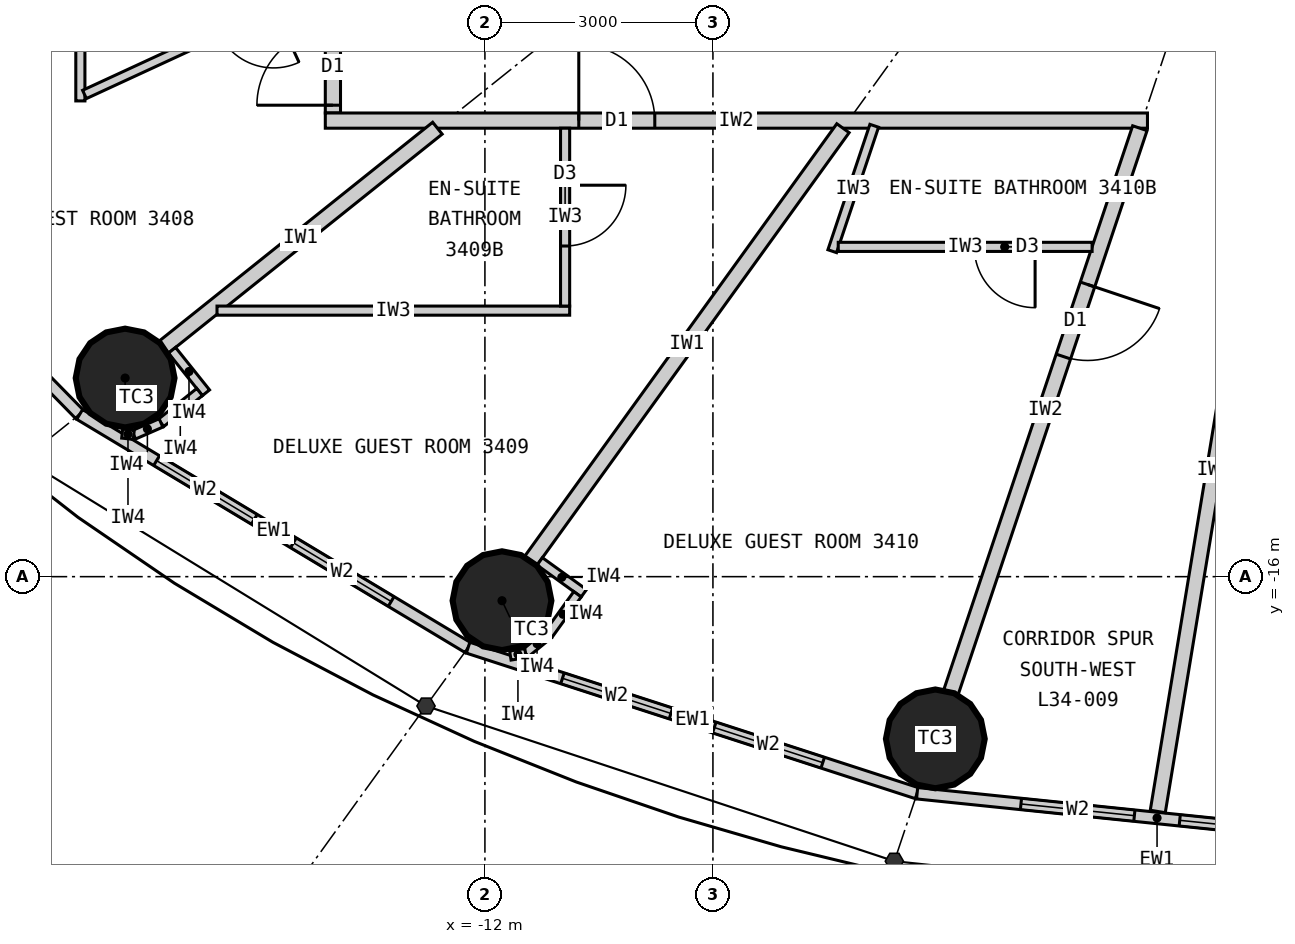
"""IFC4 building model, lengths in metres.
Left out: names, types, materials, properties, quantities, classifications, styles, units other than length and angle.
Written with IfcOpenShell. Run it as: python <this file> out.ifc"""

import sys

from ifc_helpers import new_model, si_unit, direction, frame, frame_2d, origin, origin_2d, place, context, subcontext, project, spatial, rectangle, circle, extrude, element, fill, save


model = new_model("IFC4")
c1 = context("Model", 3, precision=1e-05, world=origin(), true_north=direction((0.0, 1.0)))
c2 = subcontext(c1, "Body", "Model", "MODEL_VIEW")
j1 = project(units=[si_unit("LENGTHUNIT", "METRE"), si_unit("PLANEANGLEUNIT", "RADIAN")], contexts=[c1])
p1 = place(None, origin())
s1 = spatial("IfcSite", under=j1, at=p1, CompositionType="ELEMENT")
p2 = place(p1, origin())
s2 = spatial("IfcBuilding", under=s1, at=p2, CompositionType="ELEMENT")
p3 = place(p2, frame((0.0, 0.0, 132.0)))
s3 = spatial("IfcBuildingStorey", under=s2, at=p3, CompositionType="ELEMENT", Elevation=132.0)
for number, where, z_axis, x_axis in (
    (1, (-16.734, -13.387, 0.0), (0.0, 0.0, 1.0), (1.0, 0.0, 0.0)),
    (2, (-11.775, -16.316, 0.0), (0.0, 0.0, 1.0), (1.0, 0.0, 0.0)),
    (3, (-6.074, -18.135, 0.0), (0.0, 0.0, 1.0), (1.0, 0.0, 0.0)),
):
    element("IfcColumn", number, at=place(p3, frame(where, z_axis=z_axis, x_axis=x_axis)), inside=s3, PredefinedType="COLUMN", context=c2, shape_type="SweptSolid", body=[
        extrude(circle(Radius=0.65, at=origin_2d()), origin(), (0.0, 0.0, 1.0), 3.3),
    ])
p4 = place(p3, frame((-21.287, -9.832, 0.0), z_axis=(0.0, 0.0, 1.0), x_axis=(0.700136650834, -0.714008872605, 0.0)))
e4 = element("IfcWall", 4, at=p4, inside=s3, PredefinedType="ELEMENTEDWALL", context=c2, shape_type="SweptSolid", body=[
    extrude(rectangle(XDim=5.649, YDim=0.15, at=frame_2d((2.825, 0.0))), origin(), (0.0, 0.0, 1.0), 3.12),
])
p5 = place(p4, frame((1.025, 0.0, 0.9)))
e5 = element("IfcOpeningElement", 5, at=p5, cuts=e4, PredefinedType="OPENING", context=c2, shape_type="SweptSolid", body=[
    extrude(rectangle(XDim=1.5, YDim=1.9, at=frame_2d((0.75, 0.95))), frame((0.0, 0.085, 0.0), z_axis=(0.0, -1.0, 0.0), x_axis=(1.0, 0.0, 0.0)), (0.0, 0.0, 1.0), 0.17),
])
p6 = place(p4, frame((3.125, 0.0, 0.9)))
e6 = element("IfcOpeningElement", 6, at=p6, cuts=e4, PredefinedType="OPENING", context=c2, shape_type="SweptSolid", body=[
    extrude(rectangle(XDim=1.5, YDim=1.9, at=frame_2d((0.75, 0.95))), frame((0.0, 0.085, 0.0), z_axis=(0.0, -1.0, 0.0), x_axis=(1.0, 0.0, 0.0)), (0.0, 0.0, 1.0), 0.17),
])
p7 = place(p3, frame((-17.332, -13.866, 0.0), z_axis=(0.0, 0.0, 1.0), x_axis=(0.857308573723, -0.514802884044, 0.0)))
e7 = element("IfcWall", 7, at=p7, inside=s3, PredefinedType="ELEMENTEDWALL", context=c2, shape_type="SweptSolid", body=[
    extrude(rectangle(XDim=5.961, YDim=0.15, at=frame_2d((2.98, 0.0))), origin(), (0.0, 0.0, 1.0), 3.12),
])
p8 = place(p7, frame((1.181, 0.0, 0.9)))
e8 = element("IfcOpeningElement", 8, at=p8, cuts=e7, PredefinedType="OPENING", context=c2, shape_type="SweptSolid", body=[
    extrude(rectangle(XDim=1.5, YDim=1.9, at=frame_2d((0.75, 0.95))), frame((0.0, 0.085, 0.0), z_axis=(0.0, -1.0, 0.0), x_axis=(1.0, 0.0, 0.0)), (0.0, 0.0, 1.0), 0.17),
])
p9 = place(p7, frame((3.281, 0.0, 0.9)))
e9 = element("IfcOpeningElement", 9, at=p9, cuts=e7, PredefinedType="OPENING", context=c2, shape_type="SweptSolid", body=[
    extrude(rectangle(XDim=1.5, YDim=1.9, at=frame_2d((0.75, 0.95))), frame((0.0, 0.085, 0.0), z_axis=(0.0, -1.0, 0.0), x_axis=(1.0, 0.0, 0.0)), (0.0, 0.0, 1.0), 0.17),
])
p10 = place(p3, frame((-12.221, -16.935, 0.0), z_axis=(0.0, 0.0, 1.0), x_axis=(0.951272691506, -0.308350881944, 0.0)))
e10 = element("IfcWall", 10, at=p10, inside=s3, PredefinedType="ELEMENTEDWALL", context=c2, shape_type="SweptSolid", body=[
    extrude(rectangle(XDim=6.211, YDim=0.15, at=frame_2d((3.105, 0.0))), origin(), (0.0, 0.0, 1.0), 3.12),
])
p11 = place(p10, frame((1.305, 0.0, 0.9)))
e11 = element("IfcOpeningElement", 11, at=p11, cuts=e10, PredefinedType="OPENING", context=c2, shape_type="SweptSolid", body=[
    extrude(rectangle(XDim=1.5, YDim=1.9, at=frame_2d((0.75, 0.95))), frame((0.0, 0.085, 0.0), z_axis=(0.0, -1.0, 0.0), x_axis=(1.0, 0.0, 0.0)), (0.0, 0.0, 1.0), 0.17),
])
p12 = place(p10, frame((3.405, 0.0, 0.9)))
e12 = element("IfcOpeningElement", 12, at=p12, cuts=e10, PredefinedType="OPENING", context=c2, shape_type="SweptSolid", body=[
    extrude(rectangle(XDim=1.5, YDim=1.9, at=frame_2d((0.75, 0.95))), frame((0.0, 0.085, 0.0), z_axis=(0.0, -1.0, 0.0), x_axis=(1.0, 0.0, 0.0)), (0.0, 0.0, 1.0), 0.17),
])
p13 = place(p3, frame((-6.313, -18.85, 0.0), z_axis=(0.0, 0.0, 1.0), x_axis=(0.994735690163, -0.102473931887, 0.0)))
e13 = element("IfcWall", 13, at=p13, inside=s3, PredefinedType="ELEMENTEDWALL", context=c2, shape_type="SweptSolid", body=[
    extrude(rectangle(XDim=6.347, YDim=0.15, at=frame_2d((3.173, 0.0))), origin(), (0.0, 0.0, 1.0), 3.12),
])
p14 = place(p13, frame((1.373, 0.0, 0.9)))
e14 = element("IfcOpeningElement", 14, at=p14, cuts=e13, PredefinedType="OPENING", context=c2, shape_type="SweptSolid", body=[
    extrude(rectangle(XDim=1.5, YDim=1.9, at=frame_2d((0.75, 0.95))), frame((0.0, 0.085, 0.0), z_axis=(0.0, -1.0, 0.0), x_axis=(1.0, 0.0, 0.0)), (0.0, 0.0, 1.0), 0.17),
])
p15 = place(p13, frame((3.473, 0.0, 0.9)))
e15 = element("IfcOpeningElement", 15, at=p15, cuts=e13, PredefinedType="OPENING", context=c2, shape_type="SweptSolid", body=[
    extrude(rectangle(XDim=1.5, YDim=1.9, at=frame_2d((0.75, 0.95))), frame((0.0, 0.085, 0.0), z_axis=(0.0, -1.0, 0.0), x_axis=(1.0, 0.0, 0.0)), (0.0, 0.0, 1.0), 0.17),
])
p16 = place(p3, frame((-14.0, 9.9, 0.0), z_axis=(0.0, 0.0, 1.0), x_axis=(0.0, -1.0, 0.0)))
e16 = element("IfcWall", 16, at=p16, inside=s3, PredefinedType="PARTITIONING", context=c2, shape_type="SweptSolid", body=[
    extrude(rectangle(XDim=19.8, YDim=0.2, at=frame_2d((9.9, 0.0))), origin(), (0.0, 0.0, 1.0), 3.12),
])
p17 = place(p16, frame((2.822, 0.0, 0.0)))
e17 = element("IfcOpeningElement", 17, at=p17, cuts=e16, PredefinedType="OPENING", context=c2, shape_type="SweptSolid", body=[
    extrude(rectangle(XDim=1.0, YDim=2.2, at=frame_2d((0.5, 1.1))), frame((0.0, 0.11, 0.0), z_axis=(0.0, -1.0, 0.0), x_axis=(1.0, 0.0, 0.0)), (0.0, 0.0, 1.0), 0.22),
])
p18 = place(p16, frame((13.742, 0.0, 0.0)))
e18 = element("IfcOpeningElement", 18, at=p18, cuts=e16, PredefinedType="OPENING", context=c2, shape_type="SweptSolid", body=[
    extrude(rectangle(XDim=1.0, YDim=2.2, at=frame_2d((0.5, 1.1))), frame((0.0, 0.11, 0.0), z_axis=(0.0, -1.0, 0.0), x_axis=(1.0, 0.0, 0.0)), (0.0, 0.0, 1.0), 0.22),
])
p19 = place(p16, frame((18.698, 0.0, 0.0)))
e19 = element("IfcOpeningElement", 19, at=p19, cuts=e16, PredefinedType="OPENING", context=c2, shape_type="SweptSolid", body=[
    extrude(rectangle(XDim=1.0, YDim=2.2, at=frame_2d((0.5, 1.1))), frame((0.0, 0.11, 0.0), z_axis=(0.0, -1.0, 0.0), x_axis=(1.0, 0.0, 0.0)), (0.0, 0.0, 1.0), 0.22),
])
p20 = place(p3, frame((-3.283, -10.0, 0.0), z_axis=(0.0, 0.0, 1.0), x_axis=(-1.0, 0.0, 0.0)))
e20 = element("IfcWall", 20, at=p20, inside=s3, PredefinedType="PARTITIONING", context=c2, shape_type="SweptSolid", body=[
    extrude(rectangle(XDim=10.817, YDim=0.2, at=frame_2d((5.409, 0.0))), origin(), (0.0, 0.0, 1.0), 3.12),
])
p21 = place(p20, frame((6.482, 0.0, 0.0)))
e21 = element("IfcOpeningElement", 21, at=p21, cuts=e20, PredefinedType="OPENING", context=c2, shape_type="SweptSolid", body=[
    extrude(rectangle(XDim=1.0, YDim=2.2, at=frame_2d((0.5, 1.1))), frame((0.0, 0.11, 0.0), z_axis=(0.0, -1.0, 0.0), x_axis=(1.0, 0.0, 0.0)), (0.0, 0.0, 1.0), 0.22),
])
p22 = place(p3, frame((-14.1, -6.512, 0.0), z_axis=(0.0, 0.0, 1.0), x_axis=(-0.907833019998, -0.419331858797, 0.0)))
e22 = element("IfcWall", 22, at=p22, inside=s3, PredefinedType="PARTITIONING", context=c2, shape_type="SweptSolid", body=[
    extrude(rectangle(XDim=6.505, YDim=0.2, at=frame_2d((3.252, 0.0))), origin(), (0.0, 0.0, 1.0), 2.22),
])
p23 = place(p3, frame((-12.625, -10.1, 0.0), z_axis=(0.0, 0.0, 1.0), x_axis=(-0.780863644897, -0.624701503182, 0.0)))
e23 = element("IfcWall", 23, at=p23, inside=s3, PredefinedType="PARTITIONING", context=c2, shape_type="SweptSolid", body=[
    extrude(rectangle(XDim=4.612, YDim=0.2, at=frame_2d((2.306, 0.0))), origin(), (0.0, 0.0, 1.0), 2.27),
])
p24 = place(p3, frame((-7.289, -10.1, 0.0), z_axis=(0.0, 0.0, 1.0), x_axis=(-0.585217367024, -0.81087645997, 0.0)))
e24 = element("IfcWall", 24, at=p24, inside=s3, PredefinedType="PARTITIONING", context=c2, shape_type="SweptSolid", body=[
    extrude(rectangle(XDim=7.016, YDim=0.2, at=frame_2d((3.508, 0.0))), origin(), (0.0, 0.0, 1.0), 2.27),
])
p25 = place(p3, frame((-3.383, -10.1, 0.0), z_axis=(0.0, 0.0, 1.0), x_axis=(-0.317603705574, -0.948223542318, 0.0)))
e25 = element("IfcWall", 25, at=p25, inside=s3, PredefinedType="PARTITIONING", context=c2, shape_type="SweptSolid", body=[
    extrude(rectangle(XDim=7.823, YDim=0.2, at=frame_2d((3.912, 0.0))), origin(), (0.0, 0.0, 1.0), 2.27),
])
p26 = place(p25, frame((2.168, 0.0, 0.0)))
e26 = element("IfcOpeningElement", 26, at=p26, cuts=e25, PredefinedType="OPENING", context=c2, shape_type="SweptSolid", body=[
    extrude(rectangle(XDim=1.0, YDim=2.2, at=frame_2d((0.5, 1.1))), frame((0.0, 0.11, 0.0), z_axis=(0.0, -1.0, 0.0), x_axis=(1.0, 0.0, 0.0)), (0.0, 0.0, 1.0), 0.22),
])
p27 = place(p3, frame((-1.665, -10.1, 0.0), z_axis=(0.0, 0.0, 1.0), x_axis=(-0.162660519103, -0.986682094459, 0.0)))
e27 = element("IfcWall", 27, at=p27, inside=s3, PredefinedType="PARTITIONING", context=c2, shape_type="SweptSolid", body=[
    extrude(rectangle(XDim=9.111, YDim=0.2, at=frame_2d((4.555, 0.0))), origin(), (0.0, 0.0, 1.0), 3.12),
])
p28 = place(p27, frame((1.86, 0.0, 0.0)))
e28 = element("IfcOpeningElement", 28, at=p28, cuts=e27, PredefinedType="OPENING", context=c2, shape_type="SweptSolid", body=[
    extrude(rectangle(XDim=1.0, YDim=2.2, at=frame_2d((0.5, 1.1))), frame((0.0, 0.11, 0.0), z_axis=(0.0, -1.0, 0.0), x_axis=(1.0, 0.0, 0.0)), (0.0, 0.0, 1.0), 0.22),
])
p29 = place(p3, frame((-17.323, -8.101, 0.0), z_axis=(0.0, 0.0, 1.0), x_axis=(0.0, -1.0, 0.0)))
e29 = element("IfcWall", 29, at=p29, inside=s3, PredefinedType="PARTITIONING", context=c2, shape_type="SweptSolid", body=[
    extrude(rectangle(XDim=1.64, YDim=0.12, at=frame_2d((0.82, 0.0))), origin(), (0.0, 0.0, 1.0), 3.12),
])
p30 = place(p3, frame((-14.1, -8.193, 0.0), z_axis=(0.0, 0.0, 1.0), x_axis=(-0.907836493557, -0.419324338628, 0.0)))
e30 = element("IfcWall", 30, at=p30, inside=s3, PredefinedType="PARTITIONING", context=c2, shape_type="SweptSolid", body=[
    extrude(rectangle(XDim=3.49, YDim=0.12, at=frame_2d((1.745, 0.0))), origin(), (0.0, 0.0, 1.0), 3.12),
])
p31 = place(p30, frame((0.75, 0.0, 0.0)))
e31 = element("IfcOpeningElement", 31, at=p31, cuts=e30, PredefinedType="OPENING", context=c2, shape_type="SweptSolid", body=[
    extrude(rectangle(XDim=0.8, YDim=2.1, at=frame_2d((0.4, 1.05))), frame((0.0, 0.07, 0.0), z_axis=(0.0, -1.0, 0.0), x_axis=(1.0, 0.0, 0.0)), (0.0, 0.0, 1.0), 0.14),
])
p32 = place(p3, frame((-15.525, -12.5, 0.0), z_axis=(0.0, 0.0, 1.0), x_axis=(1.0, 0.0, 0.0)))
e32 = element("IfcWall", 32, at=p32, inside=s3, PredefinedType="PARTITIONING", context=c2, shape_type="SweptSolid", body=[
    extrude(rectangle(XDim=4.64, YDim=0.12, at=frame_2d((2.32, 0.0))), origin(), (0.0, 0.0, 1.0), 3.12),
])
p33 = place(p3, frame((-10.945, -10.1, 0.0), z_axis=(0.0, 0.0, 1.0), x_axis=(0.0, -1.0, 0.0)))
e33 = element("IfcWall", 33, at=p33, inside=s3, PredefinedType="PARTITIONING", context=c2, shape_type="SweptSolid", body=[
    extrude(rectangle(XDim=2.34, YDim=0.12, at=frame_2d((1.17, 0.0))), origin(), (0.0, 0.0, 1.0), 3.12),
])
p34 = place(p33, frame((0.75, 0.0, 0.0)))
e34 = element("IfcOpeningElement", 34, at=p34, cuts=e33, PredefinedType="OPENING", context=c2, shape_type="SweptSolid", body=[
    extrude(rectangle(XDim=0.8, YDim=2.1, at=frame_2d((0.4, 1.05))), frame((0.0, 0.07, 0.0), z_axis=(0.0, -1.0, 0.0), x_axis=(1.0, 0.0, 0.0)), (0.0, 0.0, 1.0), 0.14),
])
p35 = place(p3, frame((-6.878, -10.068, 0.0), z_axis=(0.0, 0.0, 1.0), x_axis=(-0.317532394508, -0.948247424694, 0.0)))
e35 = element("IfcWall", 35, at=p35, inside=s3, PredefinedType="PARTITIONING", context=c2, shape_type="SweptSolid", body=[
    extrude(rectangle(XDim=1.74, YDim=0.12, at=frame_2d((0.87, 0.0))), origin(), (0.0, 0.0, 1.0), 3.12),
])
p36 = place(p3, frame((-4.011, -11.661, 0.0), z_axis=(0.0, 0.0, 1.0), x_axis=(-1.0, 0.0, 0.0)))
e36 = element("IfcWall", 36, at=p36, inside=s3, PredefinedType="PARTITIONING", context=c2, shape_type="SweptSolid", body=[
    extrude(rectangle(XDim=3.34, YDim=0.12, at=frame_2d((1.67, 0.0))), origin(), (0.0, 0.0, 1.0), 3.12),
])
p37 = place(p36, frame((0.75, 0.0, 0.0)))
e37 = element("IfcOpeningElement", 37, at=p37, cuts=e36, PredefinedType="OPENING", context=c2, shape_type="SweptSolid", body=[
    extrude(rectangle(XDim=0.8, YDim=2.1, at=frame_2d((0.4, 1.05))), frame((0.0, 0.07, 0.0), z_axis=(0.0, -1.0, 0.0), x_axis=(1.0, 0.0, 0.0)), (0.0, 0.0, 1.0), 0.14),
])
p38 = place(p3, frame((-16.117, -13.022, 0.0), z_axis=(0.0, 0.0, 1.0), x_axis=(0.62465344249, -0.780902091677, 0.0)))
e38 = element("IfcWall", 38, at=p38, inside=s3, PredefinedType="PARTITIONING", context=c2, shape_type="SweptSolid", body=[
    extrude(rectangle(XDim=0.716, YDim=0.12, at=frame_2d((0.358, 0.0))), origin(), (0.0, 0.0, 1.0), 3.12),
])
p39 = place(p3, frame((-15.754, -13.571, 0.0), z_axis=(0.0, 0.0, 1.0), x_axis=(-0.780905453553, -0.624649239663, 0.0)))
e39 = element("IfcWall", 39, at=p39, inside=s3, PredefinedType="PARTITIONING", context=c2, shape_type="SweptSolid", body=[
    extrude(rectangle(XDim=0.65, YDim=0.12, at=frame_2d((0.325, 0.0))), origin(), (0.0, 0.0, 1.0), 3.12),
])
p40 = place(p3, frame((-16.262, -13.977, 0.0), z_axis=(0.0, 0.0, 1.0), x_axis=(-0.915985403703, -0.401211590314, 0.0)))
e40 = element("IfcWall", 40, at=p40, inside=s3, PredefinedType="PARTITIONING", context=c2, shape_type="SweptSolid", body=[
    extrude(rectangle(XDim=0.391, YDim=0.12, at=frame_2d((0.196, 0.0))), origin(), (0.0, 0.0, 1.0), 3.12),
])
p41 = place(p3, frame((-16.62, -14.134, 0.0), z_axis=(0.0, 0.0, 1.0), x_axis=(-0.993941871493, 0.109907033867, 0.0)))
e41 = element("IfcWall", 41, at=p41, inside=s3, PredefinedType="PARTITIONING", context=c2, shape_type="SweptSolid", body=[
    extrude(rectangle(XDim=0.153, YDim=0.12, at=frame_2d((0.077, 0.0))), origin(), (0.0, 0.0, 1.0), 3.12),
])
p42 = place(p3, frame((-11.279, -15.799, 0.0), z_axis=(0.0, 0.0, 1.0), x_axis=(0.810912957127, -0.585166793285, 0.0)))
e42 = element("IfcWall", 42, at=p42, inside=s3, PredefinedType="PARTITIONING", context=c2, shape_type="SweptSolid", body=[
    extrude(rectangle(XDim=0.716, YDim=0.12, at=frame_2d((0.358, 0.0))), origin(), (0.0, 0.0, 1.0), 3.12),
])
p43 = place(p3, frame((-10.782, -16.231, 0.0), z_axis=(0.0, 0.0, 1.0), x_axis=(-0.585175102182, -0.810906961239, 0.0)))
e43 = element("IfcWall", 43, at=p43, inside=s3, PredefinedType="PARTITIONING", context=c2, shape_type="SweptSolid", body=[
    extrude(rectangle(XDim=0.65, YDim=0.12, at=frame_2d((0.325, 0.0))), origin(), (0.0, 0.0, 1.0), 3.12),
])
p44 = place(p3, frame((-11.162, -16.759, 0.0), z_axis=(0.0, 0.0, 1.0), x_axis=(-0.775178428527, -0.63174235567, 0.0)))
e44 = element("IfcWall", 44, at=p44, inside=s3, PredefinedType="PARTITIONING", context=c2, shape_type="SweptSolid", body=[
    extrude(rectangle(XDim=0.392, YDim=0.12, at=frame_2d((0.196, 0.0))), origin(), (0.0, 0.0, 1.0), 3.12),
])
p45 = place(p3, frame((-11.466, -17.006, 0.0), z_axis=(0.0, 0.0, 1.0), x_axis=(-0.987228877621, -0.15930832744, 0.0)))
e45 = element("IfcWall", 45, at=p45, inside=s3, PredefinedType="PARTITIONING", context=c2, shape_type="SweptSolid", body=[
    extrude(rectangle(XDim=0.202, YDim=0.12, at=frame_2d((0.101, 0.0))), origin(), (0.0, 0.0, 1.0), 3.12),
])
p46 = place(p8, origin())
e46 = element("IfcWindow", 46, at=p46, inside=s3, PartitioningType="SINGLE_PANEL", PredefinedType="WINDOW", context=c2, shape_type="SweptSolid", body=[
    extrude(rectangle(XDim=1.5, YDim=1.9, at=frame_2d((0.75, 0.95))), frame((0.0, 0.03, 0.0), z_axis=(0.0, -1.0, 0.0), x_axis=(1.0, 0.0, 0.0)), (0.0, 0.0, 1.0), 0.06),
])
fill(e8, e46)
p47 = place(p9, origin())
e47 = element("IfcWindow", 47, at=p47, inside=s3, PartitioningType="SINGLE_PANEL", PredefinedType="WINDOW", context=c2, shape_type="SweptSolid", body=[
    extrude(rectangle(XDim=1.5, YDim=1.9, at=frame_2d((0.75, 0.95))), frame((0.0, 0.03, 0.0), z_axis=(0.0, -1.0, 0.0), x_axis=(1.0, 0.0, 0.0)), (0.0, 0.0, 1.0), 0.06),
])
fill(e9, e47)
p48 = place(p11, origin())
e48 = element("IfcWindow", 48, at=p48, inside=s3, PartitioningType="SINGLE_PANEL", PredefinedType="WINDOW", context=c2, shape_type="SweptSolid", body=[
    extrude(rectangle(XDim=1.5, YDim=1.9, at=frame_2d((0.75, 0.95))), frame((0.0, 0.03, 0.0), z_axis=(0.0, -1.0, 0.0), x_axis=(1.0, 0.0, 0.0)), (0.0, 0.0, 1.0), 0.06),
])
fill(e11, e48)
p49 = place(p12, origin())
e49 = element("IfcWindow", 49, at=p49, inside=s3, PartitioningType="SINGLE_PANEL", PredefinedType="WINDOW", context=c2, shape_type="SweptSolid", body=[
    extrude(rectangle(XDim=1.5, YDim=1.9, at=frame_2d((0.75, 0.95))), frame((0.0, 0.03, 0.0), z_axis=(0.0, -1.0, 0.0), x_axis=(1.0, 0.0, 0.0)), (0.0, 0.0, 1.0), 0.06),
])
fill(e12, e49)
p50 = place(p14, origin())
e50 = element("IfcWindow", 50, at=p50, inside=s3, PartitioningType="SINGLE_PANEL", PredefinedType="WINDOW", context=c2, shape_type="SweptSolid", body=[
    extrude(rectangle(XDim=1.5, YDim=1.9, at=frame_2d((0.75, 0.95))), frame((0.0, 0.03, 0.0), z_axis=(0.0, -1.0, 0.0), x_axis=(1.0, 0.0, 0.0)), (0.0, 0.0, 1.0), 0.06),
])
fill(e14, e50)
p51 = place(p15, origin())
e51 = element("IfcWindow", 51, at=p51, inside=s3, PartitioningType="SINGLE_PANEL", PredefinedType="WINDOW", context=c2, shape_type="SweptSolid", body=[
    extrude(rectangle(XDim=1.5, YDim=1.9, at=frame_2d((0.75, 0.95))), frame((0.0, 0.03, 0.0), z_axis=(0.0, -1.0, 0.0), x_axis=(1.0, 0.0, 0.0)), (0.0, 0.0, 1.0), 0.06),
])
fill(e15, e51)
p52 = place(p19, origin())
e52 = element("IfcDoor", 52, at=p52, inside=s3, OperationType="SINGLE_SWING_RIGHT", PredefinedType="DOOR", context=c2, shape_type="SweptSolid", body=[
    extrude(rectangle(XDim=1.0, YDim=2.2, at=frame_2d((0.5, 1.1))), frame((0.0, 0.025, 0.0), z_axis=(0.0, -1.0, 0.0), x_axis=(1.0, 0.0, 0.0)), (0.0, 0.0, 1.0), 0.05),
])
fill(e19, e52)
p53 = place(p34, origin())
e53 = element("IfcDoor", 53, at=p53, inside=s3, OperationType="SINGLE_SWING_LEFT", PredefinedType="DOOR", context=c2, shape_type="SweptSolid", body=[
    extrude(rectangle(XDim=0.8, YDim=2.1, at=frame_2d((0.4, 1.05))), frame((0.0, 0.025, 0.0), z_axis=(0.0, -1.0, 0.0), x_axis=(1.0, 0.0, 0.0)), (0.0, 0.0, 1.0), 0.05),
])
fill(e34, e53)
p54 = place(p21, origin())
e54 = element("IfcDoor", 54, at=p54, inside=s3, OperationType="SINGLE_SWING_RIGHT", PredefinedType="DOOR", context=c2, shape_type="SweptSolid", body=[
    extrude(rectangle(XDim=1.0, YDim=2.2, at=frame_2d((0.5, 1.1))), frame((0.0, 0.025, 0.0), z_axis=(0.0, -1.0, 0.0), x_axis=(1.0, 0.0, 0.0)), (0.0, 0.0, 1.0), 0.05),
])
fill(e21, e54)
p55 = place(p37, origin())
e55 = element("IfcDoor", 55, at=p55, inside=s3, OperationType="SINGLE_SWING_LEFT", PredefinedType="DOOR", context=c2, shape_type="SweptSolid", body=[
    extrude(rectangle(XDim=0.8, YDim=2.1, at=frame_2d((0.4, 1.05))), frame((0.0, 0.025, 0.0), z_axis=(0.0, -1.0, 0.0), x_axis=(1.0, 0.0, 0.0)), (0.0, 0.0, 1.0), 0.05),
])
fill(e37, e55)
p56 = place(p26, origin())
e56 = element("IfcDoor", 56, at=p56, inside=s3, OperationType="SINGLE_SWING_LEFT", PredefinedType="DOOR", context=c2, shape_type="SweptSolid", body=[
    extrude(rectangle(XDim=1.0, YDim=2.2, at=frame_2d((0.5, 1.1))), frame((0.0, 0.025, 0.0), z_axis=(0.0, -1.0, 0.0), x_axis=(1.0, 0.0, 0.0)), (0.0, 0.0, 1.0), 0.05),
])
fill(e26, e56)
save(model, sys.argv[1])
